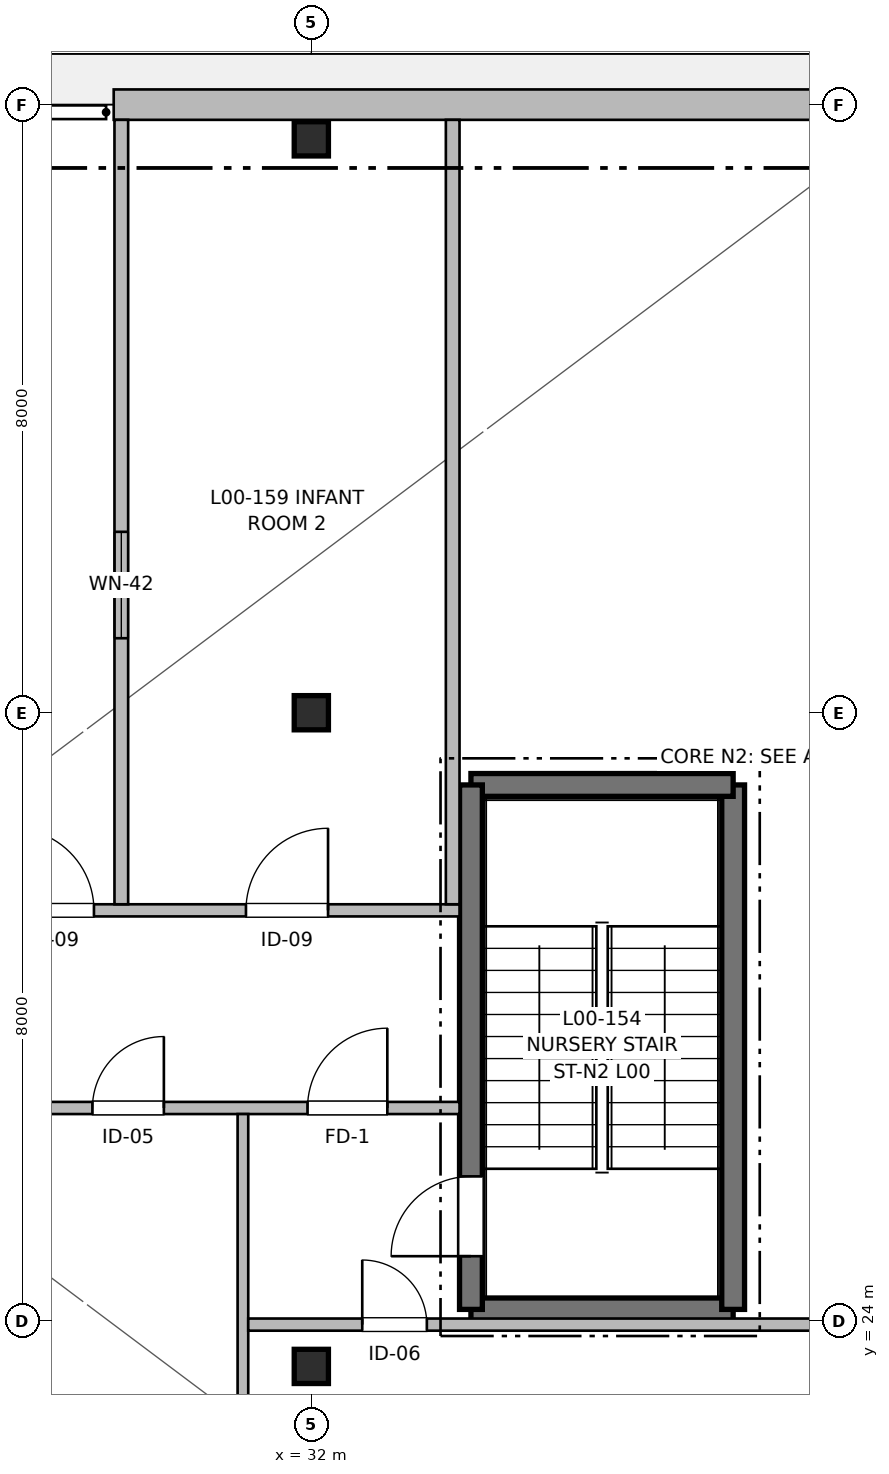
"""IFC4 building model, lengths in metres.
Left out: names, types, materials, properties, quantities, classifications, styles, units other than length and angle.
Written with IfcOpenShell. Run it as: python <this file> out.ifc"""

import sys

from ifc_helpers import new_model, si_unit, direction, frame, frame_2d, origin, origin_2d, place, context, subcontext, project, spatial, rectangle, extrude, element, fill, save


model = new_model("IFC4")
c1 = context("Model", 3, precision=1e-05, world=origin(), true_north=direction((0.0, 1.0)))
c2 = subcontext(c1, "Body", "Model", "MODEL_VIEW")
j1 = project(units=[si_unit("LENGTHUNIT", "METRE"), si_unit("PLANEANGLEUNIT", "RADIAN")], contexts=[c1])
p1 = place(None, origin())
s1 = spatial("IfcSite", under=j1, at=p1, CompositionType="ELEMENT")
p2 = place(p1, origin())
s2 = spatial("IfcBuilding", under=s1, at=p2, CompositionType="ELEMENT")
p3 = place(p2, origin())
s3 = spatial("IfcBuildingStorey", under=s2, at=p3, CompositionType="ELEMENT", Elevation=0.0)
for number, where, z_axis, x_axis in (
    (1, (32.0, 23.4, 0.0), (0.0, 0.0, 1.0), (1.0, 0.0, 0.0)),
    (2, (32.0, 32.0, 0.0), (0.0, 0.0, 1.0), (1.0, 0.0, 0.0)),
    (3, (32.0, 39.55, 0.0), (0.0, 0.0, 1.0), (1.0, 0.0, 0.0)),
):
    element("IfcColumn", number, at=place(p3, frame(where, z_axis=z_axis, x_axis=x_axis)), inside=s3, PredefinedType="COLUMN", context=c2, shape_type="SweptSolid", body=[
        extrude(rectangle(XDim=0.45, YDim=0.45, at=origin_2d()), origin(), (0.0, 0.0, 1.0), 4.16),
    ])
p4 = place(p3, frame((29.4, 40.0, 0.0), z_axis=(0.0, 0.0, 1.0), x_axis=(1.0, 0.0, 0.0)))
e4 = element("IfcWall", 4, at=p4, inside=s3, PredefinedType="SOLIDWALL", context=c2, shape_type="SweptSolid", body=[
    extrude(rectangle(XDim=10.6, YDim=0.4, at=frame_2d((5.3, 0.0))), origin(), (0.0, 0.0, 1.0), 3.9),
])
p5 = place(p3, frame((34.1, 24.15, 0.0), z_axis=(0.0, 0.0, 1.0), x_axis=(1.0, 0.0, 0.0)))
e5 = element("IfcWall", 5, at=p5, inside=s3, PredefinedType="SHEAR", context=c2, shape_type="SweptSolid", body=[
    extrude(rectangle(XDim=3.45, YDim=0.3, at=frame_2d((1.725, 0.0))), origin(), (0.0, 0.0, 1.0), 4.16),
])
p6 = place(p3, frame((37.55, 31.05, 0.0), z_axis=(0.0, 0.0, 1.0), x_axis=(0.0, -1.0, 0.0)))
e6 = element("IfcWall", 6, at=p6, inside=s3, PredefinedType="SHEAR", context=c2, shape_type="SweptSolid", body=[
    extrude(rectangle(XDim=6.9, YDim=0.3, at=frame_2d((3.45, 0.0))), origin(), (0.0, 0.0, 1.0), 4.16),
])
p7 = place(p3, frame((34.1, 31.05, 0.0), z_axis=(0.0, 0.0, 1.0), x_axis=(1.0, 0.0, 0.0)))
e7 = element("IfcWall", 7, at=p7, inside=s3, PredefinedType="SHEAR", context=c2, shape_type="SweptSolid", body=[
    extrude(rectangle(XDim=3.45, YDim=0.3, at=frame_2d((1.725, 0.0))), origin(), (0.0, 0.0, 1.0), 4.16),
])
p8 = place(p3, frame((34.1, 24.15, 0.0), z_axis=(0.0, 0.0, 1.0), x_axis=(0.0, 1.0, 0.0)))
e8 = element("IfcWall", 8, at=p8, inside=s3, PredefinedType="SHEAR", context=c2, shape_type="SweptSolid", body=[
    extrude(rectangle(XDim=6.9, YDim=0.3, at=frame_2d((3.45, 0.0))), origin(), (0.0, 0.0, 1.0), 4.16),
])
p9 = place(p8, frame((0.7, 0.0, 0.0)))
e9 = element("IfcOpeningElement", 9, at=p9, cuts=e8, PredefinedType="OPENING", context=c2, shape_type="SweptSolid", body=[
    extrude(rectangle(XDim=1.05, YDim=2.15, at=frame_2d((0.525, 1.075))), frame((0.0, 0.16, 0.0), z_axis=(0.0, -1.0, 0.0), x_axis=(1.0, 0.0, 0.0)), (0.0, 0.0, 1.0), 0.32),
])
p10 = place(p3, frame((13.5, 26.8, 0.0), z_axis=(0.0, 0.0, 1.0), x_axis=(1.0, 0.0, 0.0)))
e10 = element("IfcWall", 10, at=p10, inside=s3, PredefinedType="PARTITIONING", context=c2, shape_type="SweptSolid", body=[
    extrude(rectangle(XDim=20.45, YDim=0.16, at=frame_2d((10.225, 0.0))), origin(), (0.0, 0.0, 1.0), 3.89),
])
p11 = place(p10, frame((1.65, 0.0, 0.0)))
e11 = element("IfcOpeningElement", 11, at=p11, cuts=e10, PredefinedType="OPENING", context=c2, shape_type="SweptSolid", body=[
    extrude(rectangle(XDim=1.05, YDim=2.15, at=frame_2d((0.525, 1.075))), frame((0.0, 0.09, 0.0), z_axis=(0.0, -1.0, 0.0), x_axis=(1.0, 0.0, 0.0)), (0.0, 0.0, 1.0), 0.18),
])
p12 = place(p10, frame((18.45, 0.0, 0.0)))
e12 = element("IfcOpeningElement", 12, at=p12, cuts=e10, PredefinedType="OPENING", context=c2, shape_type="SweptSolid", body=[
    extrude(rectangle(XDim=1.05, YDim=2.15, at=frame_2d((0.525, 1.075))), frame((0.0, 0.09, 0.0), z_axis=(0.0, -1.0, 0.0), x_axis=(1.0, 0.0, 0.0)), (0.0, 0.0, 1.0), 0.18),
])
p13 = place(p10, frame((8.47, 0.0, 0.0)))
e13 = element("IfcOpeningElement", 13, at=p13, cuts=e10, PredefinedType="OPENING", context=c2, shape_type="SweptSolid", body=[
    extrude(rectangle(XDim=1.08, YDim=2.15, at=frame_2d((0.54, 1.075))), frame((0.0, 0.09, 0.0), z_axis=(0.0, -1.0, 0.0), x_axis=(1.0, 0.0, 0.0)), (0.0, 0.0, 1.0), 0.18),
])
p14 = place(p10, frame((12.52, 0.0, 0.0)))
e14 = element("IfcOpeningElement", 14, at=p14, cuts=e10, PredefinedType="OPENING", context=c2, shape_type="SweptSolid", body=[
    extrude(rectangle(XDim=0.87, YDim=2.05, at=frame_2d((0.435, 1.025))), frame((0.0, 0.09, 0.0), z_axis=(0.0, -1.0, 0.0), x_axis=(1.0, 0.0, 0.0)), (0.0, 0.0, 1.0), 0.18),
])
p15 = place(p10, frame((15.62, 0.0, 0.0)))
e15 = element("IfcOpeningElement", 15, at=p15, cuts=e10, PredefinedType="OPENING", context=c2, shape_type="SweptSolid", body=[
    extrude(rectangle(XDim=0.94, YDim=2.1, at=frame_2d((0.47, 1.05))), frame((0.0, 0.09, 0.0), z_axis=(0.0, -1.0, 0.0), x_axis=(1.0, 0.0, 0.0)), (0.0, 0.0, 1.0), 0.18),
])
p16 = place(p3, frame((13.5, 29.4, 0.0), z_axis=(0.0, 0.0, 1.0), x_axis=(1.0, 0.0, 0.0)))
e16 = element("IfcWall", 16, at=p16, inside=s3, PredefinedType="PARTITIONING", context=c2, shape_type="SweptSolid", body=[
    extrude(rectangle(XDim=20.45, YDim=0.16, at=frame_2d((10.225, 0.0))), origin(), (0.0, 0.0, 1.0), 3.89),
])
p17 = place(p16, frame((2.705, 0.0, 0.0)))
e17 = element("IfcOpeningElement", 17, at=p17, cuts=e16, PredefinedType="OPENING", context=c2, shape_type="SweptSolid", body=[
    extrude(rectangle(XDim=1.08, YDim=2.15, at=frame_2d((0.54, 1.075))), frame((0.0, 0.09, 0.0), z_axis=(0.0, -1.0, 0.0), x_axis=(1.0, 0.0, 0.0)), (0.0, 0.0, 1.0), 0.18),
])
p18 = place(p16, frame((8.66, 0.0, 0.0)))
e18 = element("IfcOpeningElement", 18, at=p18, cuts=e16, PredefinedType="OPENING", context=c2, shape_type="SweptSolid", body=[
    extrude(rectangle(XDim=1.08, YDim=2.15, at=frame_2d((0.54, 1.075))), frame((0.0, 0.09, 0.0), z_axis=(0.0, -1.0, 0.0), x_axis=(1.0, 0.0, 0.0)), (0.0, 0.0, 1.0), 0.18),
])
p19 = place(p16, frame((14.56, 0.0, 0.0)))
e19 = element("IfcOpeningElement", 19, at=p19, cuts=e16, PredefinedType="OPENING", context=c2, shape_type="SweptSolid", body=[
    extrude(rectangle(XDim=1.08, YDim=2.15, at=frame_2d((0.54, 1.075))), frame((0.0, 0.09, 0.0), z_axis=(0.0, -1.0, 0.0), x_axis=(1.0, 0.0, 0.0)), (0.0, 0.0, 1.0), 0.18),
])
p20 = place(p16, frame((17.64, 0.0, 0.0)))
e20 = element("IfcOpeningElement", 20, at=p20, cuts=e16, PredefinedType="OPENING", context=c2, shape_type="SweptSolid", body=[
    extrude(rectangle(XDim=1.08, YDim=2.15, at=frame_2d((0.54, 1.075))), frame((0.0, 0.09, 0.0), z_axis=(0.0, -1.0, 0.0), x_axis=(1.0, 0.0, 0.0)), (0.0, 0.0, 1.0), 0.18),
])
p21 = place(p3, frame((31.1, 16.2, 0.0), z_axis=(0.0, 0.0, 1.0), x_axis=(0.0, 1.0, 0.0)))
e21 = element("IfcWall", 21, at=p21, inside=s3, PredefinedType="PARTITIONING", context=c2, shape_type="SweptSolid", body=[
    extrude(rectangle(XDim=10.52, YDim=0.14, at=frame_2d((5.26, 0.0))), origin(), (0.0, 0.0, 1.0), 3.89),
])
p22 = place(p3, frame((29.5, 29.48, 0.0), z_axis=(0.0, 0.0, 1.0), x_axis=(0.0, 1.0, 0.0)))
e22 = element("IfcWall", 22, at=p22, inside=s3, PredefinedType="PARTITIONING", context=c2, shape_type="SweptSolid", body=[
    extrude(rectangle(XDim=10.32, YDim=0.18, at=frame_2d((5.16, 0.0))), origin(), (0.0, 0.0, 1.0), 3.89),
])
p23 = place(p22, frame((3.5, 0.0, 1.05)))
e23 = element("IfcOpeningElement", 23, at=p23, cuts=e22, PredefinedType="OPENING", context=c2, shape_type="SweptSolid", body=[
    extrude(rectangle(XDim=1.4, YDim=1.1, at=frame_2d((0.7, 0.55))), frame((0.0, 0.1, 0.0), z_axis=(0.0, -1.0, 0.0), x_axis=(1.0, 0.0, 0.0)), (0.0, 0.0, 1.0), 0.2),
])
p24 = place(p3, frame((33.86, 29.48, 0.0), z_axis=(0.0, 0.0, 1.0), x_axis=(0.0, 1.0, 0.0)))
e24 = element("IfcWall", 24, at=p24, inside=s3, PredefinedType="PARTITIONING", context=c2, shape_type="SweptSolid", body=[
    extrude(rectangle(XDim=10.32, YDim=0.18, at=frame_2d((5.16, 0.0))), origin(), (0.0, 0.0, 1.0), 3.89),
])
p25 = place(p3, frame((31.17, 23.95, 0.0), z_axis=(0.0, 0.0, 1.0), x_axis=(1.0, 0.0, 0.0)))
e25 = element("IfcWall", 25, at=p25, inside=s3, PredefinedType="PARTITIONING", context=c2, shape_type="SweptSolid", body=[
    extrude(rectangle(XDim=8.67, YDim=0.16, at=frame_2d((4.335, 0.0))), origin(), (0.0, 0.0, 1.0), 3.89),
])
p26 = place(p25, frame((1.5, 0.0, 0.0)))
e26 = element("IfcOpeningElement", 26, at=p26, cuts=e25, PredefinedType="OPENING", context=c2, shape_type="SweptSolid", body=[
    extrude(rectangle(XDim=0.85, YDim=2.05, at=frame_2d((0.425, 1.025))), frame((0.0, 0.09, 0.0), z_axis=(0.0, -1.0, 0.0), x_axis=(1.0, 0.0, 0.0)), (0.0, 0.0, 1.0), 0.18),
])
p27 = place(p9, origin())
e27 = element("IfcDoor", 27, at=p27, inside=s3, OperationType="SINGLE_SWING_LEFT", PredefinedType="DOOR", context=c2, shape_type="SweptSolid", body=[
    extrude(rectangle(XDim=1.05, YDim=2.15, at=frame_2d((0.525, 1.075))), frame((0.0, 0.025, 0.0), z_axis=(0.0, -1.0, 0.0), x_axis=(1.0, 0.0, 0.0)), (0.0, 0.0, 1.0), 0.05),
])
fill(e9, e27)
p28 = place(p23, origin())
e28 = element("IfcWindow", 28, at=p28, inside=s3, PartitioningType="SINGLE_PANEL", PredefinedType="WINDOW", context=c2, shape_type="SweptSolid", body=[
    extrude(rectangle(XDim=1.4, YDim=1.1, at=frame_2d((0.7, 0.55))), frame((0.0, 0.03, 0.0), z_axis=(0.0, -1.0, 0.0), x_axis=(1.0, 0.0, 0.0)), (0.0, 0.0, 1.0), 0.06),
])
fill(e23, e28)
p29 = place(p12, origin())
e29 = element("IfcDoor", 29, at=p29, inside=s3, OperationType="SINGLE_SWING_RIGHT", PredefinedType="DOOR", context=c2, shape_type="SweptSolid", body=[
    extrude(rectangle(XDim=1.05, YDim=2.15, at=frame_2d((0.525, 1.075))), frame((0.0, 0.025, 0.0), z_axis=(0.0, -1.0, 0.0), x_axis=(1.0, 0.0, 0.0)), (0.0, 0.0, 1.0), 0.05),
])
fill(e12, e29)
p30 = place(p19, origin())
e30 = element("IfcDoor", 30, at=p30, inside=s3, OperationType="SINGLE_SWING_LEFT", PredefinedType="DOOR", context=c2, shape_type="SweptSolid", body=[
    extrude(rectangle(XDim=1.08, YDim=2.15, at=frame_2d((0.54, 1.075))), frame((0.0, 0.025, 0.0), z_axis=(0.0, -1.0, 0.0), x_axis=(1.0, 0.0, 0.0)), (0.0, 0.0, 1.0), 0.05),
])
fill(e19, e30)
p31 = place(p20, origin())
e31 = element("IfcDoor", 31, at=p31, inside=s3, OperationType="SINGLE_SWING_RIGHT", PredefinedType="DOOR", context=c2, shape_type="SweptSolid", body=[
    extrude(rectangle(XDim=1.08, YDim=2.15, at=frame_2d((0.54, 1.075))), frame((0.0, 0.025, 0.0), z_axis=(0.0, -1.0, 0.0), x_axis=(1.0, 0.0, 0.0)), (0.0, 0.0, 1.0), 0.05),
])
fill(e20, e31)
p32 = place(p26, origin())
e32 = element("IfcDoor", 32, at=p32, inside=s3, OperationType="SINGLE_SWING_LEFT", PredefinedType="DOOR", context=c2, shape_type="SweptSolid", body=[
    extrude(rectangle(XDim=0.85, YDim=2.05, at=frame_2d((0.425, 1.025))), frame((0.0, 0.025, 0.0), z_axis=(0.0, -1.0, 0.0), x_axis=(1.0, 0.0, 0.0)), (0.0, 0.0, 1.0), 0.05),
])
fill(e26, e32)
p33 = place(p15, origin())
e33 = element("IfcDoor", 33, at=p33, inside=s3, OperationType="SINGLE_SWING_RIGHT", PredefinedType="DOOR", context=c2, shape_type="SweptSolid", body=[
    extrude(rectangle(XDim=0.94, YDim=2.1, at=frame_2d((0.47, 1.05))), frame((0.0, 0.025, 0.0), z_axis=(0.0, -1.0, 0.0), x_axis=(1.0, 0.0, 0.0)), (0.0, 0.0, 1.0), 0.05),
])
fill(e15, e33)
save(model, sys.argv[1])
